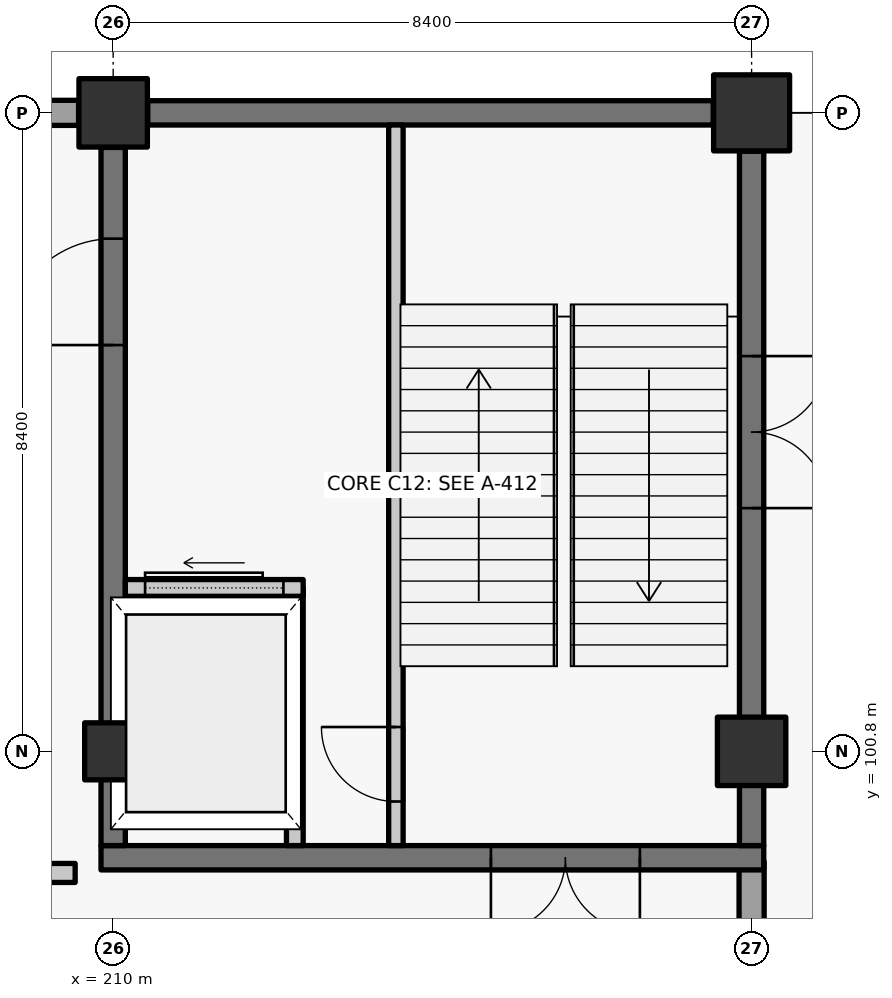
"""IFC4 building model, lengths in metres.
Left out: names, types, materials, properties, quantities, classifications, styles, units other than length and angle.
Written with IfcOpenShell. Run it as: python <this file> out.ifc"""

import sys

from ifc_helpers import new_model, si_unit, direction, frame, frame_2d, origin, origin_2d, place, context, subcontext, project, spatial, rectangle, extrude, element, fill, save


model = new_model("IFC4")
c1 = context("Model", 3, precision=1e-05, world=origin(), true_north=direction((0.0, 1.0)))
c2 = subcontext(c1, "Body", "Model", "MODEL_VIEW")
j1 = project(units=[si_unit("LENGTHUNIT", "METRE"), si_unit("PLANEANGLEUNIT", "RADIAN")], contexts=[c1])
p1 = place(None, origin())
s1 = spatial("IfcSite", under=j1, at=p1, CompositionType="ELEMENT")
p2 = place(p1, origin())
s2 = spatial("IfcBuilding", under=s1, at=p2, CompositionType="ELEMENT")
p3 = place(p2, origin())
s3 = spatial("IfcBuildingStorey", under=s2, at=p3, CompositionType="ELEMENT", Elevation=0.0)
p4 = place(p3, frame((210.0, 100.8, -0.36), z_axis=(0.0, 0.0, 1.0), x_axis=(1.0, 0.0, 0.0)))
e1 = element("IfcColumn", 1, at=p4, inside=s3, PredefinedType="COLUMN", context=c2, shape_type="SweptSolid", body=[
    extrude(rectangle(XDim=0.75, YDim=0.75, at=origin_2d()), origin(), (0.0, 0.0, 1.0), 6.36),
])
for number, where, z_axis, x_axis in (
    (2, (210.0, 109.2, -0.36), (0.0, 0.0, 1.0), (1.0, 0.0, 0.0)),
    (3, (218.4, 100.8, -0.36), (0.0, 0.0, 1.0), (1.0, 0.0, 0.0)),
):
    element("IfcColumn", number, at=place(p3, frame(where, z_axis=z_axis, x_axis=x_axis)), inside=s3, PredefinedType="COLUMN", context=c2, shape_type="SweptSolid", body=[
        extrude(rectangle(XDim=0.9, YDim=0.9, at=origin_2d()), origin(), (0.0, 0.0, 1.0), 6.36),
    ])
p5 = place(p3, frame((218.4, 109.2, -0.36), z_axis=(0.0, 0.0, 1.0), x_axis=(1.0, 0.0, 0.0)))
e4 = element("IfcColumn", 4, at=p5, inside=s3, PredefinedType="COLUMN", context=c2, shape_type="SweptSolid", body=[
    extrude(rectangle(XDim=1.0, YDim=1.0, at=origin_2d()), origin(), (0.0, 0.0, 1.0), 6.36),
])
p6 = place(p3, frame((218.4, 99.35, 0.0), z_axis=(0.0, 0.0, 1.0), x_axis=(0.0, -1.0, 0.0)))
e5 = element("IfcWall", 5, at=p6, inside=s3, PredefinedType="SOLIDWALL", context=c2, shape_type="SweptSolid", body=[
    extrude(rectangle(XDim=6.495, YDim=0.33, at=frame_2d((3.248, 0.0))), origin(), (0.0, 0.0, 1.0), 5.28),
])
p7 = place(p6, frame((2.035, 0.0, 0.0)))
e6 = element("IfcOpeningElement", 6, at=p7, cuts=e5, PredefinedType="OPENING", context=c2, shape_type="SweptSolid", body=[
    extrude(rectangle(XDim=2.4, YDim=2.6, at=frame_2d((1.2, 1.3))), frame((0.0, 0.175, 0.0), z_axis=(0.0, -1.0, 0.0), x_axis=(1.0, 0.0, 0.0)), (0.0, 0.0, 1.0), 0.35),
])
p8 = place(p3, frame((202.055, 109.2, 0.0), z_axis=(0.0, 0.0, 1.0), x_axis=(1.0, 0.0, 0.0)))
e7 = element("IfcWall", 7, at=p8, inside=s3, PredefinedType="SOLIDWALL", context=c2, shape_type="SweptSolid", body=[
    extrude(rectangle(XDim=7.49, YDim=0.33, at=frame_2d((3.745, 0.0))), origin(), (0.0, 0.0, 1.0), 5.19),
])
p9 = place(p8, frame((2.045, 0.0, 1.4)))
e8 = element("IfcOpeningElement", 8, at=p9, cuts=e7, PredefinedType="OPENING", context=c2, shape_type="SweptSolid", body=[
    extrude(rectangle(XDim=3.4, YDim=1.4, at=frame_2d((1.7, 0.7))), frame((0.0, 0.175, 0.0), z_axis=(0.0, -1.0, 0.0), x_axis=(1.0, 0.0, 0.0)), (0.0, 0.0, 1.0), 0.35),
])
p10 = place(p3, frame((218.56, 99.4, -0.36), z_axis=(0.0, 0.0, 1.0), x_axis=(-1.0, 0.0, 0.0)))
e9 = element("IfcWall", 9, at=p10, inside=s3, PredefinedType="SHEAR", context=c2, shape_type="SweptSolid", body=[
    extrude(rectangle(XDim=8.72, YDim=0.32, at=frame_2d((4.36, 0.0))), origin(), (0.0, 0.0, 1.0), 6.08),
])
p11 = place(p10, frame((1.63, 0.0, 0.36)))
e10 = element("IfcOpeningElement", 10, at=p11, cuts=e9, PredefinedType="OPENING", context=c2, shape_type="SweptSolid", body=[
    extrude(rectangle(XDim=1.96, YDim=2.2, at=frame_2d((0.98, 1.1))), frame((0.0, 0.17, 0.0), z_axis=(0.0, -1.0, 0.0), x_axis=(1.0, 0.0, 0.0)), (0.0, 0.0, 1.0), 0.34),
])
p12 = place(p3, frame((210.0, 99.56, -0.36), z_axis=(0.0, 0.0, 1.0), x_axis=(0.0, 1.0, 0.0)))
e11 = element("IfcWall", 11, at=p12, inside=s3, PredefinedType="SHEAR", context=c2, shape_type="SweptSolid", body=[
    extrude(rectangle(XDim=9.185, YDim=0.32, at=frame_2d((4.593, 0.0))), origin(), (0.0, 0.0, 1.0), 6.08),
])
p13 = place(p12, frame((6.585, 0.0, 0.36)))
e12 = element("IfcOpeningElement", 12, at=p13, cuts=e11, PredefinedType="OPENING", context=c2, shape_type="SweptSolid", body=[
    extrude(rectangle(XDim=1.4, YDim=2.2, at=frame_2d((0.7, 1.1))), frame((0.0, 0.17, 0.0), z_axis=(0.0, -1.0, 0.0), x_axis=(1.0, 0.0, 0.0)), (0.0, 0.0, 1.0), 0.34),
])
p14 = place(p3, frame((210.455, 109.2, -0.36), z_axis=(0.0, 0.0, 1.0), x_axis=(1.0, 0.0, 0.0)))
e13 = element("IfcWall", 13, at=p14, inside=s3, PredefinedType="SHEAR", context=c2, shape_type="SweptSolid", body=[
    extrude(rectangle(XDim=7.44, YDim=0.32, at=frame_2d((3.72, 0.0))), origin(), (0.0, 0.0, 1.0), 6.08),
])
p15 = place(p3, frame((218.4, 108.695, -0.36), z_axis=(0.0, 0.0, 1.0), x_axis=(0.0, -1.0, 0.0)))
e14 = element("IfcWall", 14, at=p15, inside=s3, PredefinedType="SHEAR", context=c2, shape_type="SweptSolid", body=[
    extrude(rectangle(XDim=9.135, YDim=0.32, at=frame_2d((4.567, 0.0))), origin(), (0.0, 0.0, 1.0), 6.08),
])
p16 = place(p15, frame((2.695, 0.0, 0.36)))
e15 = element("IfcOpeningElement", 15, at=p16, cuts=e14, PredefinedType="OPENING", context=c2, shape_type="SweptSolid", body=[
    extrude(rectangle(XDim=2.0, YDim=2.28, at=frame_2d((1.0, 1.14))), frame((0.0, 0.17, 0.0), z_axis=(0.0, -1.0, 0.0), x_axis=(1.0, 0.0, 0.0)), (0.0, 0.0, 1.0), 0.34),
])
p17 = place(p3, frame((213.72, 99.56, -0.36), z_axis=(0.0, 0.0, 1.0), x_axis=(0.0, 1.0, 0.0)))
e16 = element("IfcWall", 16, at=p17, inside=s3, PredefinedType="SOLIDWALL", context=c2, shape_type="SweptSolid", body=[
    extrude(rectangle(XDim=9.48, YDim=0.19, at=frame_2d((4.74, 0.0))), origin(), (0.0, 0.0, 1.0), 6.08),
])
p18 = place(p17, frame((0.58, 0.0, 0.36)))
e17 = element("IfcOpeningElement", 17, at=p18, cuts=e16, PredefinedType="OPENING", context=c2, shape_type="SweptSolid", body=[
    extrude(rectangle(XDim=0.98, YDim=2.15, at=frame_2d((0.49, 1.075))), frame((0.0, 0.105, 0.0), z_axis=(0.0, -1.0, 0.0), x_axis=(1.0, 0.0, 0.0)), (0.0, 0.0, 1.0), 0.21),
])
p19 = place(p3, frame((212.39, 99.56, 0.0), z_axis=(0.0, 0.0, 1.0), x_axis=(0.0, 1.0, 0.0)))
e18 = element("IfcWall", 18, at=p19, inside=s3, PredefinedType="SOLIDWALL", context=c2, shape_type="SweptSolid", body=[
    extrude(rectangle(XDim=3.39, YDim=0.22, at=frame_2d((1.695, 0.0))), origin(), (0.0, 0.0, 1.0), 5.72),
])
p20 = place(p3, frame((210.16, 102.95, 0.0), z_axis=(0.0, 0.0, 1.0), x_axis=(1.0, 0.0, 0.0)))
e19 = element("IfcWall", 19, at=p20, inside=s3, PredefinedType="SOLIDWALL", context=c2, shape_type="SweptSolid", body=[
    extrude(rectangle(XDim=2.34, YDim=0.22, at=frame_2d((1.17, 0.0))), origin(), (0.0, 0.0, 1.0), 5.72),
])
p21 = place(p20, frame((0.26, 0.0, 0.0)))
e20 = element("IfcOpeningElement", 20, at=p21, cuts=e19, PredefinedType="OPENING", context=c2, shape_type="SweptSolid", body=[
    extrude(rectangle(XDim=1.82, YDim=2.4, at=frame_2d((0.91, 1.2))), frame((0.0, 0.12, 0.0), z_axis=(0.0, -1.0, 0.0), x_axis=(1.0, 0.0, 0.0)), (0.0, 0.0, 1.0), 0.24),
])
p22 = place(p3, frame((143.3, 99.2, 0.0), z_axis=(0.0, 0.0, 1.0), x_axis=(1.0, 0.0, 0.0)))
e21 = element("IfcWall", 21, at=p22, inside=s3, PredefinedType="SOLIDWALL", context=c2, shape_type="SweptSolid", body=[
    extrude(rectangle(XDim=66.2, YDim=0.25, at=frame_2d((33.1, 0.0))), origin(), (0.0, 0.0, 1.0), 5.73),
])
p23 = place(p22, frame((11.05, 0.0, 0.0)))
e22 = element("IfcOpeningElement", 22, at=p23, cuts=e21, PredefinedType="OPENING", context=c2, shape_type="SweptSolid", body=[
    extrude(rectangle(XDim=2.1, YDim=2.3, at=frame_2d((1.05, 1.15))), frame((0.0, 0.135, 0.0), z_axis=(0.0, -1.0, 0.0), x_axis=(1.0, 0.0, 0.0)), (0.0, 0.0, 1.0), 0.27),
])
p24 = place(p22, frame((44.65, 0.0, 0.0)))
e23 = element("IfcOpeningElement", 23, at=p24, cuts=e21, PredefinedType="OPENING", context=c2, shape_type="SweptSolid", body=[
    extrude(rectangle(XDim=2.1, YDim=2.3, at=frame_2d((1.05, 1.15))), frame((0.0, 0.135, 0.0), z_axis=(0.0, -1.0, 0.0), x_axis=(1.0, 0.0, 0.0)), (0.0, 0.0, 1.0), 0.27),
])
p25 = place(p18, origin())
e24 = element("IfcDoor", 24, at=p25, inside=s3, OperationType="SINGLE_SWING_RIGHT", PredefinedType="DOOR", context=c2, shape_type="SweptSolid", body=[
    extrude(rectangle(XDim=0.98, YDim=2.15, at=frame_2d((0.49, 1.075))), frame((0.0, 0.025, 0.0), z_axis=(0.0, -1.0, 0.0), x_axis=(1.0, 0.0, 0.0)), (0.0, 0.0, 1.0), 0.05),
])
fill(e17, e24)
p26 = place(p11, origin())
e25 = element("IfcDoor", 25, at=p26, inside=s3, OperationType="DOUBLE_DOOR_SINGLE_SWING", PredefinedType="DOOR", context=c2, shape_type="SweptSolid", body=[
    extrude(rectangle(XDim=1.96, YDim=2.2, at=frame_2d((0.98, 1.1))), frame((0.0, 0.025, 0.0), z_axis=(0.0, -1.0, 0.0), x_axis=(1.0, 0.0, 0.0)), (0.0, 0.0, 1.0), 0.05),
])
fill(e10, e25)
p27 = place(p13, origin())
e26 = element("IfcDoor", 26, at=p27, inside=s3, OperationType="SINGLE_SWING_LEFT", PredefinedType="DOOR", context=c2, shape_type="SweptSolid", body=[
    extrude(rectangle(XDim=1.4, YDim=2.2, at=frame_2d((0.7, 1.1))), frame((0.0, 0.025, 0.0), z_axis=(0.0, -1.0, 0.0), x_axis=(1.0, 0.0, 0.0)), (0.0, 0.0, 1.0), 0.05),
])
fill(e12, e26)
p28 = place(p16, origin())
e27 = element("IfcDoor", 27, at=p28, inside=s3, OperationType="DOUBLE_DOOR_SINGLE_SWING", PredefinedType="DOOR", context=c2, shape_type="SweptSolid", body=[
    extrude(rectangle(XDim=2.0, YDim=2.28, at=frame_2d((1.0, 1.14))), frame((0.0, 0.025, 0.0), z_axis=(0.0, -1.0, 0.0), x_axis=(1.0, 0.0, 0.0)), (0.0, 0.0, 1.0), 0.05),
])
fill(e15, e27)
p29 = place(p21, origin())
e28 = element("IfcDoor", 28, at=p29, inside=s3, OperationType="SLIDING_TO_LEFT", PredefinedType="DOOR", context=c2, shape_type="SweptSolid", body=[
    extrude(rectangle(XDim=1.82, YDim=2.4, at=frame_2d((0.91, 1.2))), frame((0.0, 0.025, 0.0), z_axis=(0.0, -1.0, 0.0), x_axis=(1.0, 0.0, 0.0)), (0.0, 0.0, 1.0), 0.05),
])
fill(e20, e28)
save(model, sys.argv[1])
